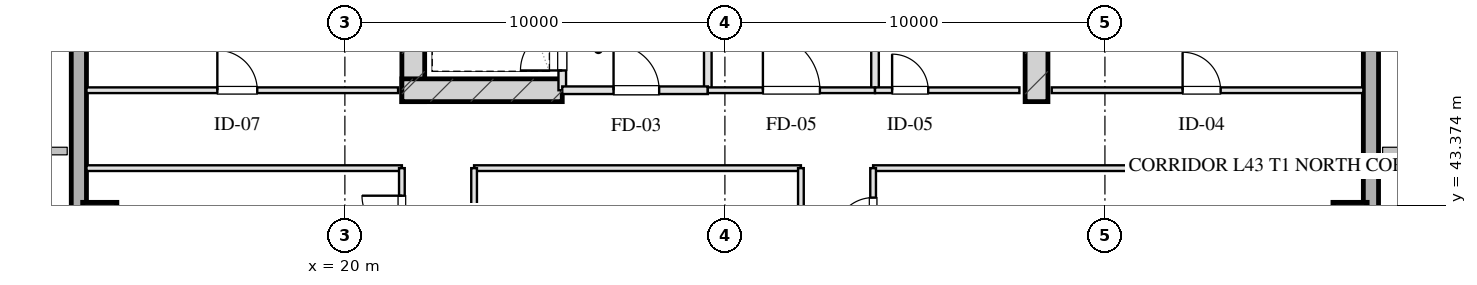
"""IFC4 building model, lengths in metres.
Left out: names, types, materials, properties, quantities, classifications, styles, units other than length and angle.
Written with IfcOpenShell. Run it as: python <this file> out.ifc"""

import sys

from ifc_helpers import new_model, si_unit, direction, frame, frame_2d, origin, origin_2d, place, context, subcontext, project, spatial, rectangle, hollow_rectangle, extrude, element, fill, save


model = new_model("IFC4")
c1 = context("Model", 3, precision=1e-05, world=origin(), true_north=direction((0.0, 1.0)))
c2 = subcontext(c1, "Body", "Model", "MODEL_VIEW")
j1 = project(units=[si_unit("LENGTHUNIT", "METRE"), si_unit("PLANEANGLEUNIT", "RADIAN")], contexts=[c1])
p1 = place(None, origin())
s1 = spatial("IfcSite", under=j1, at=p1, CompositionType="ELEMENT")
p2 = place(p1, origin())
s2 = spatial("IfcBuilding", under=s1, at=p2, CompositionType="ELEMENT")
p3 = place(p2, frame((0.0, 0.0, 163.3)))
s3 = spatial("IfcBuildingStorey", under=s2, at=p3, CompositionType="ELEMENT", Elevation=163.3)
for number, where, z_axis, x_axis in (
    (1, (21.8, 46.1, 0.0), (0.0, 0.0, 1.0), (0.0, 1.0, 0.0)),
    (2, (38.2, 46.1, 0.0), (0.0, 0.0, 1.0), (0.0, 1.0, 0.0)),
):
    element("IfcWall", number, at=place(p3, frame(where, z_axis=z_axis, x_axis=x_axis)), inside=s3, PredefinedType="SHEAR", context=c2, shape_type="SweptSolid", body=[
        extrude(rectangle(XDim=9.48, YDim=0.6, at=frame_2d((4.74, 0.0))), origin(), (0.0, 0.0, 1.0), 3.45),
    ])
p4 = place(p3, frame((21.5, 46.4, 0.0), z_axis=(0.0, 0.0, 1.0), x_axis=(1.0, 0.0, 0.0)))
e3 = element("IfcWall", 3, at=p4, inside=s3, PredefinedType="SHEAR", context=c2, shape_type="SweptSolid", body=[
    extrude(rectangle(XDim=4.22, YDim=0.6, at=frame_2d((2.11, 0.0))), origin(), (0.0, 0.0, 1.0), 3.45),
])
for number, where, z_axis, x_axis in (
    (4, (13.55, 43.0, 0.0), (0.0, 0.0, 1.0), (1.0, 0.0, 0.0)),
    (5, (46.45, 43.0, 0.0), (0.0, 0.0, 1.0), (1.0, 0.0, 0.0)),
):
    element("IfcColumn", number, at=place(p3, frame(where, z_axis=z_axis, x_axis=x_axis)), inside=s3, PredefinedType="COLUMN", context=c2, shape_type="SweptSolid", body=[
        extrude(hollow_rectangle(XDim=0.9, YDim=0.9, WallThickness=0.032, at=origin_2d()), origin(), (0.0, 0.0, 1.0), 3.451),
    ])
p5 = place(p3, frame((13.0, 10.8, 0.0), z_axis=(0.0, 0.0, 1.0), x_axis=(0.0, 1.0, 0.0)))
e6 = element("IfcWall", 6, at=p5, inside=s3, PredefinedType="SOLIDWALL", context=c2, shape_type="SweptSolid", body=[
    extrude(rectangle(XDim=46.4, YDim=0.4, at=frame_2d((23.2, 0.0))), origin(), (0.0, 0.0, 1.0), 2.61),
])
p6 = place(p5, frame((28.45, 0.0, 0.0)))
e7 = element("IfcOpeningElement", 7, at=p6, cuts=e6, PredefinedType="OPENING", context=c2, shape_type="SweptSolid", body=[
    extrude(rectangle(XDim=1.1, YDim=2.15, at=frame_2d((0.55, 1.075))), frame((0.0, 0.21, 0.0), z_axis=(0.0, -1.0, 0.0), x_axis=(1.0, 0.0, 0.0)), (0.0, 0.0, 1.0), 0.42),
])
p7 = place(p3, frame((47.0, 57.2, 0.0), z_axis=(0.0, 0.0, 1.0), x_axis=(0.0, -1.0, 0.0)))
e8 = element("IfcWall", 8, at=p7, inside=s3, PredefinedType="SOLIDWALL", context=c2, shape_type="SweptSolid", body=[
    extrude(rectangle(XDim=46.4, YDim=0.4, at=frame_2d((23.2, 0.0))), origin(), (0.0, 0.0, 1.0), 2.61),
])
p8 = place(p7, frame((28.475, 0.0, 0.75)))
e9 = element("IfcOpeningElement", 9, at=p8, cuts=e8, PredefinedType="OPENING", context=c2, shape_type="SweptSolid", body=[
    extrude(rectangle(XDim=2.25, YDim=1.46, at=frame_2d((1.125, 0.73))), frame((0.0, 0.21, 0.0), z_axis=(0.0, -1.0, 0.0), x_axis=(1.0, 0.0, 0.0)), (0.0, 0.0, 1.0), 0.42),
])
p9 = place(p7, frame((24.675, 0.0, 0.75)))
e10 = element("IfcOpeningElement", 10, at=p9, cuts=e8, PredefinedType="OPENING", context=c2, shape_type="SweptSolid", body=[
    extrude(rectangle(XDim=2.25, YDim=1.46, at=frame_2d((1.125, 0.73))), frame((0.0, 0.21, 0.0), z_axis=(0.0, -1.0, 0.0), x_axis=(1.0, 0.0, 0.0)), (0.0, 0.0, 1.0), 0.42),
])
p10 = place(p7, frame((18.25, 0.0, 0.0)))
e11 = element("IfcOpeningElement", 11, at=p10, cuts=e8, PredefinedType="OPENING", context=c2, shape_type="SweptSolid", body=[
    extrude(rectangle(XDim=1.1, YDim=2.15, at=frame_2d((0.55, 1.075))), frame((0.0, 0.21, 0.0), z_axis=(0.0, -1.0, 0.0), x_axis=(1.0, 0.0, 0.0)), (0.0, 0.0, 1.0), 0.42),
])
p11 = place(p3, frame((25.72, 46.4, 0.0), z_axis=(0.0, 0.0, 1.0), x_axis=(0.0, 1.0, 0.0)))
e12 = element("IfcWall", 12, at=p11, inside=s3, PredefinedType="PARTITIONING", context=c2, shape_type="SweptSolid", body=[
    extrude(rectangle(XDim=1.9, YDim=0.2, at=frame_2d((0.95, 0.0))), origin(), (0.0, 0.0, 1.0), 3.175),
])
p12 = place(p11, frame((0.52, 0.0, 0.0)))
e13 = element("IfcOpeningElement", 13, at=p12, cuts=e12, PredefinedType="OPENING", context=c2, shape_type="SweptSolid", body=[
    extrude(rectangle(XDim=1.1, YDim=2.05, at=frame_2d((0.55, 1.025))), frame((0.0, 0.11, 0.0), z_axis=(0.0, -1.0, 0.0), x_axis=(1.0, 0.0, 0.0)), (0.0, 0.0, 1.0), 0.22),
])
p13 = place(p3, frame((29.55, 46.4, 0.0), z_axis=(0.0, 0.0, 1.0), x_axis=(0.0, 1.0, 0.0)))
e14 = element("IfcWall", 14, at=p13, inside=s3, PredefinedType="PARTITIONING", context=c2, shape_type="SweptSolid", body=[
    extrude(rectangle(XDim=8.43, YDim=0.2, at=frame_2d((4.215, 0.0))), origin(), (0.0, 0.0, 1.0), 3.175),
])
p14 = place(p3, frame((25.72, 46.4, 0.0), z_axis=(0.0, 0.0, 1.0), x_axis=(1.0, 0.0, 0.0)))
e15 = element("IfcWall", 15, at=p14, inside=s3, PredefinedType="PARTITIONING", context=c2, shape_type="SweptSolid", body=[
    extrude(rectangle(XDim=3.83, YDim=0.2, at=frame_2d((1.915, 0.0))), origin(), (0.0, 0.0, 1.0), 3.175),
])
p15 = place(p14, frame((1.35, 0.0, 0.0)))
e16 = element("IfcOpeningElement", 16, at=p15, cuts=e15, PredefinedType="OPENING", context=c2, shape_type="SweptSolid", body=[
    extrude(rectangle(XDim=1.2, YDim=2.05, at=frame_2d((0.6, 1.025))), frame((0.0, 0.11, 0.0), z_axis=(0.0, -1.0, 0.0), x_axis=(1.0, 0.0, 0.0)), (0.0, 0.0, 1.0), 0.22),
])
p16 = place(p3, frame((33.95, 46.4, 0.0), z_axis=(0.0, 0.0, 1.0), x_axis=(0.0, 1.0, 0.0)))
e17 = element("IfcWall", 17, at=p16, inside=s3, PredefinedType="PARTITIONING", context=c2, shape_type="SweptSolid", body=[
    extrude(rectangle(XDim=8.43, YDim=0.2, at=frame_2d((4.215, 0.0))), origin(), (0.0, 0.0, 1.0), 3.175),
])
p17 = place(p3, frame((29.55, 46.4, 0.0), z_axis=(0.0, 0.0, 1.0), x_axis=(1.0, 0.0, 0.0)))
e18 = element("IfcWall", 18, at=p17, inside=s3, PredefinedType="PARTITIONING", context=c2, shape_type="SweptSolid", body=[
    extrude(rectangle(XDim=4.4, YDim=0.15, at=frame_2d((2.2, 0.0))), origin(), (0.0, 0.0, 1.0), 3.175),
])
p18 = place(p17, frame((1.45, 0.0, 0.0)))
e19 = element("IfcOpeningElement", 19, at=p18, cuts=e18, PredefinedType="OPENING", context=c2, shape_type="SweptSolid", body=[
    extrude(rectangle(XDim=1.5, YDim=2.05, at=frame_2d((0.75, 1.025))), frame((0.0, 0.085, 0.0), z_axis=(0.0, -1.0, 0.0), x_axis=(1.0, 0.0, 0.0)), (0.0, 0.0, 1.0), 0.17),
])
p19 = place(p3, frame((33.95, 46.4, 0.0), z_axis=(0.0, 0.0, 1.0), x_axis=(1.0, 0.0, 0.0)))
e20 = element("IfcWall", 20, at=p19, inside=s3, PredefinedType="PARTITIONING", context=c2, shape_type="SweptSolid", body=[
    extrude(rectangle(XDim=3.8, YDim=0.15, at=frame_2d((1.9, 0.0))), origin(), (0.0, 0.0, 1.0), 3.175),
])
p20 = place(p19, frame((0.45, 0.0, 0.0)))
e21 = element("IfcOpeningElement", 21, at=p20, cuts=e20, PredefinedType="OPENING", context=c2, shape_type="SweptSolid", body=[
    extrude(rectangle(XDim=0.95, YDim=2.05, at=frame_2d((0.475, 1.025))), frame((0.0, 0.085, 0.0), z_axis=(0.0, -1.0, 0.0), x_axis=(1.0, 0.0, 0.0)), (0.0, 0.0, 1.0), 0.17),
])
p21 = place(p3, frame((13.2, 46.4, 0.0), z_axis=(0.0, 0.0, 1.0), x_axis=(1.0, 0.0, 0.0)))
e22 = element("IfcWall", 22, at=p21, inside=s3, PredefinedType="PARTITIONING", context=c2, shape_type="SweptSolid", body=[
    extrude(rectangle(XDim=8.2, YDim=0.15, at=frame_2d((4.1, 0.0))), origin(), (0.0, 0.0, 1.0), 3.175),
])
p22 = place(p21, frame((3.444, 0.0, 0.0)))
e23 = element("IfcOpeningElement", 23, at=p22, cuts=e22, PredefinedType="OPENING", context=c2, shape_type="SweptSolid", body=[
    extrude(rectangle(XDim=1.05, YDim=2.05, at=frame_2d((0.525, 1.025))), frame((0.0, 0.085, 0.0), z_axis=(0.0, -1.0, 0.0), x_axis=(1.0, 0.0, 0.0)), (0.0, 0.0, 1.0), 0.17),
])
p23 = place(p3, frame((38.6, 46.4, 0.0), z_axis=(0.0, 0.0, 1.0), x_axis=(1.0, 0.0, 0.0)))
e24 = element("IfcWall", 24, at=p23, inside=s3, PredefinedType="PARTITIONING", context=c2, shape_type="SweptSolid", body=[
    extrude(rectangle(XDim=8.2, YDim=0.15, at=frame_2d((4.1, 0.0))), origin(), (0.0, 0.0, 1.0), 3.175),
])
p24 = place(p23, frame((3.444, 0.0, 0.0)))
e25 = element("IfcOpeningElement", 25, at=p24, cuts=e24, PredefinedType="OPENING", context=c2, shape_type="SweptSolid", body=[
    extrude(rectangle(XDim=1.0, YDim=2.05, at=frame_2d((0.5, 1.025))), frame((0.0, 0.085, 0.0), z_axis=(0.0, -1.0, 0.0), x_axis=(1.0, 0.0, 0.0)), (0.0, 0.0, 1.0), 0.17),
])
p25 = place(p3, frame((13.2, 44.35, 0.0), z_axis=(0.0, 0.0, 1.0), x_axis=(1.0, 0.0, 0.0)))
e26 = element("IfcWall", 26, at=p25, inside=s3, PredefinedType="PARTITIONING", context=c2, shape_type="SweptSolid", body=[
    extrude(rectangle(XDim=8.3, YDim=0.15, at=frame_2d((4.15, 0.0))), origin(), (0.0, 0.0, 1.0), 3.175),
])
p26 = place(p3, frame((23.4, 44.35, 0.0), z_axis=(0.0, 0.0, 1.0), x_axis=(1.0, 0.0, 0.0)))
e27 = element("IfcWall", 27, at=p26, inside=s3, PredefinedType="PARTITIONING", context=c2, shape_type="SweptSolid", body=[
    extrude(rectangle(XDim=8.6, YDim=0.15, at=frame_2d((4.3, 0.0))), origin(), (0.0, 0.0, 1.0), 3.175),
])
p27 = place(p3, frame((33.9, 44.35, 0.0), z_axis=(0.0, 0.0, 1.0), x_axis=(1.0, 0.0, 0.0)))
e28 = element("IfcWall", 28, at=p27, inside=s3, PredefinedType="PARTITIONING", context=c2, shape_type="SweptSolid", body=[
    extrude(rectangle(XDim=12.9, YDim=0.15, at=frame_2d((6.45, 0.0))), origin(), (0.0, 0.0, 1.0), 3.175),
])
p28 = place(p3, frame((21.5, 23.65, 0.0), z_axis=(0.0, 0.0, 1.0), x_axis=(0.0, 1.0, 0.0)))
e29 = element("IfcWall", 29, at=p28, inside=s3, PredefinedType="PARTITIONING", context=c2, shape_type="SweptSolid", body=[
    extrude(rectangle(XDim=20.7, YDim=0.15, at=frame_2d((10.35, 0.0))), origin(), (0.0, 0.0, 1.0), 3.175),
])
p29 = place(p28, frame((0.775, 0.0, 0.0)))
e30 = element("IfcOpeningElement", 30, at=p29, cuts=e29, PredefinedType="OPENING", context=c2, shape_type="SweptSolid", body=[
    extrude(rectangle(XDim=1.0, YDim=2.05, at=frame_2d((0.5, 1.025))), frame((0.0, 0.085, 0.0), z_axis=(0.0, -1.0, 0.0), x_axis=(1.0, 0.0, 0.0)), (0.0, 0.0, 1.0), 0.17),
])
p30 = place(p28, frame((3.95, 0.0, 0.0)))
e31 = element("IfcOpeningElement", 31, at=p30, cuts=e29, PredefinedType="OPENING", context=c2, shape_type="SweptSolid", body=[
    extrude(rectangle(XDim=1.0, YDim=2.05, at=frame_2d((0.5, 1.025))), frame((0.0, 0.085, 0.0), z_axis=(0.0, -1.0, 0.0), x_axis=(1.0, 0.0, 0.0)), (0.0, 0.0, 1.0), 0.17),
])
p31 = place(p28, frame((7.51, 0.0, 0.0)))
e32 = element("IfcOpeningElement", 32, at=p31, cuts=e29, PredefinedType="OPENING", context=c2, shape_type="SweptSolid", body=[
    extrude(rectangle(XDim=1.0, YDim=2.05, at=frame_2d((0.5, 1.025))), frame((0.0, 0.085, 0.0), z_axis=(0.0, -1.0, 0.0), x_axis=(1.0, 0.0, 0.0)), (0.0, 0.0, 1.0), 0.17),
])
p32 = place(p28, frame((11.51, 0.0, 0.0)))
e33 = element("IfcOpeningElement", 33, at=p32, cuts=e29, PredefinedType="OPENING", context=c2, shape_type="SweptSolid", body=[
    extrude(rectangle(XDim=0.85, YDim=2.05, at=frame_2d((0.425, 1.025))), frame((0.0, 0.085, 0.0), z_axis=(0.0, -1.0, 0.0), x_axis=(1.0, 0.0, 0.0)), (0.0, 0.0, 1.0), 0.17),
])
p33 = place(p28, frame((15.75, 0.0, 0.0)))
e34 = element("IfcOpeningElement", 34, at=p33, cuts=e29, PredefinedType="OPENING", context=c2, shape_type="SweptSolid", body=[
    extrude(rectangle(XDim=1.0, YDim=2.05, at=frame_2d((0.5, 1.025))), frame((0.0, 0.085, 0.0), z_axis=(0.0, -1.0, 0.0), x_axis=(1.0, 0.0, 0.0)), (0.0, 0.0, 1.0), 0.17),
])
p34 = place(p28, frame((18.925, 0.0, 0.0)))
e35 = element("IfcOpeningElement", 35, at=p34, cuts=e29, PredefinedType="OPENING", context=c2, shape_type="SweptSolid", body=[
    extrude(rectangle(XDim=1.05, YDim=2.05, at=frame_2d((0.525, 1.025))), frame((0.0, 0.085, 0.0), z_axis=(0.0, -1.0, 0.0), x_axis=(1.0, 0.0, 0.0)), (0.0, 0.0, 1.0), 0.17),
])
p35 = place(p3, frame((23.4, 23.65, 0.0), z_axis=(0.0, 0.0, 1.0), x_axis=(0.0, 1.0, 0.0)))
e36 = element("IfcWall", 36, at=p35, inside=s3, PredefinedType="PARTITIONING", context=c2, shape_type="SweptSolid", body=[
    extrude(rectangle(XDim=20.7, YDim=0.15, at=frame_2d((10.35, 0.0))), origin(), (0.0, 0.0, 1.0), 3.175),
])
p36 = place(p35, frame((4.117, 0.0, 0.0)))
e37 = element("IfcOpeningElement", 37, at=p36, cuts=e36, PredefinedType="OPENING", context=c2, shape_type="SweptSolid", body=[
    extrude(rectangle(XDim=1.1, YDim=2.05, at=frame_2d((0.55, 1.025))), frame((0.0, 0.085, 0.0), z_axis=(0.0, -1.0, 0.0), x_axis=(1.0, 0.0, 0.0)), (0.0, 0.0, 1.0), 0.17),
])
p37 = place(p35, frame((14.347, 0.0, 0.0)))
e38 = element("IfcOpeningElement", 38, at=p37, cuts=e36, PredefinedType="OPENING", context=c2, shape_type="SweptSolid", body=[
    extrude(rectangle(XDim=1.1, YDim=2.05, at=frame_2d((0.55, 1.025))), frame((0.0, 0.085, 0.0), z_axis=(0.0, -1.0, 0.0), x_axis=(1.0, 0.0, 0.0)), (0.0, 0.0, 1.0), 0.17),
])
p38 = place(p3, frame((32.0, 23.65, 0.0), z_axis=(0.0, 0.0, 1.0), x_axis=(0.0, 1.0, 0.0)))
e39 = element("IfcWall", 39, at=p38, inside=s3, PredefinedType="PARTITIONING", context=c2, shape_type="SweptSolid", body=[
    extrude(rectangle(XDim=20.7, YDim=0.15, at=frame_2d((10.35, 0.0))), origin(), (0.0, 0.0, 1.0), 3.175),
])
p39 = place(p3, frame((33.9, 23.65, 0.0), z_axis=(0.0, 0.0, 1.0), x_axis=(0.0, 1.0, 0.0)))
e40 = element("IfcWall", 40, at=p39, inside=s3, PredefinedType="PARTITIONING", context=c2, shape_type="SweptSolid", body=[
    extrude(rectangle(XDim=20.7, YDim=0.15, at=frame_2d((10.35, 0.0))), origin(), (0.0, 0.0, 1.0), 3.175),
])
p40 = place(p39, frame((2.329, 0.0, 0.0)))
e41 = element("IfcOpeningElement", 41, at=p40, cuts=e40, PredefinedType="OPENING", context=c2, shape_type="SweptSolid", body=[
    extrude(rectangle(XDim=1.0, YDim=2.05, at=frame_2d((0.5, 1.025))), frame((0.0, 0.085, 0.0), z_axis=(0.0, -1.0, 0.0), x_axis=(1.0, 0.0, 0.0)), (0.0, 0.0, 1.0), 0.17),
])
p41 = place(p39, frame((8.104, 0.0, 0.0)))
e42 = element("IfcOpeningElement", 42, at=p41, cuts=e40, PredefinedType="OPENING", context=c2, shape_type="SweptSolid", body=[
    extrude(rectangle(XDim=1.0, YDim=2.05, at=frame_2d((0.5, 1.025))), frame((0.0, 0.085, 0.0), z_axis=(0.0, -1.0, 0.0), x_axis=(1.0, 0.0, 0.0)), (0.0, 0.0, 1.0), 0.17),
])
p42 = place(p39, frame((14.35, 0.0, 0.0)))
e43 = element("IfcOpeningElement", 43, at=p42, cuts=e40, PredefinedType="OPENING", context=c2, shape_type="SweptSolid", body=[
    extrude(rectangle(XDim=1.0, YDim=2.05, at=frame_2d((0.5, 1.025))), frame((0.0, 0.085, 0.0), z_axis=(0.0, -1.0, 0.0), x_axis=(1.0, 0.0, 0.0)), (0.0, 0.0, 1.0), 0.17),
])
p43 = place(p39, frame((18.925, 0.0, 0.0)))
e44 = element("IfcOpeningElement", 44, at=p43, cuts=e40, PredefinedType="OPENING", context=c2, shape_type="SweptSolid", body=[
    extrude(rectangle(XDim=1.0, YDim=2.05, at=frame_2d((0.5, 1.025))), frame((0.0, 0.085, 0.0), z_axis=(0.0, -1.0, 0.0), x_axis=(1.0, 0.0, 0.0)), (0.0, 0.0, 1.0), 0.17),
])
p44 = place(p12, origin())
e45 = element("IfcDoor", 45, at=p44, inside=s3, OperationType="SINGLE_SWING_LEFT", PredefinedType="DOOR", context=c2, shape_type="SweptSolid", body=[
    extrude(rectangle(XDim=1.1, YDim=2.05, at=frame_2d((0.55, 1.025))), frame((0.0, 0.025, 0.0), z_axis=(0.0, -1.0, 0.0), x_axis=(1.0, 0.0, 0.0)), (0.0, 0.0, 1.0), 0.05),
])
fill(e13, e45)
p45 = place(p15, origin())
e46 = element("IfcDoor", 46, at=p45, inside=s3, OperationType="SINGLE_SWING_LEFT", PredefinedType="DOOR", context=c2, shape_type="SweptSolid", body=[
    extrude(rectangle(XDim=1.2, YDim=2.05, at=frame_2d((0.6, 1.025))), frame((0.0, 0.025, 0.0), z_axis=(0.0, -1.0, 0.0), x_axis=(1.0, 0.0, 0.0)), (0.0, 0.0, 1.0), 0.05),
])
fill(e16, e46)
p46 = place(p18, origin())
e47 = element("IfcDoor", 47, at=p46, inside=s3, OperationType="SINGLE_SWING_LEFT", PredefinedType="DOOR", context=c2, shape_type="SweptSolid", body=[
    extrude(rectangle(XDim=1.5, YDim=2.05, at=frame_2d((0.75, 1.025))), frame((0.0, 0.025, 0.0), z_axis=(0.0, -1.0, 0.0), x_axis=(1.0, 0.0, 0.0)), (0.0, 0.0, 1.0), 0.05),
])
fill(e19, e47)
p47 = place(p20, origin())
e48 = element("IfcDoor", 48, at=p47, inside=s3, OperationType="SINGLE_SWING_LEFT", PredefinedType="DOOR", context=c2, shape_type="SweptSolid", body=[
    extrude(rectangle(XDim=0.95, YDim=2.05, at=frame_2d((0.475, 1.025))), frame((0.0, 0.025, 0.0), z_axis=(0.0, -1.0, 0.0), x_axis=(1.0, 0.0, 0.0)), (0.0, 0.0, 1.0), 0.05),
])
fill(e21, e48)
p48 = place(p22, origin())
e49 = element("IfcDoor", 49, at=p48, inside=s3, OperationType="SINGLE_SWING_LEFT", PredefinedType="DOOR", context=c2, shape_type="SweptSolid", body=[
    extrude(rectangle(XDim=1.05, YDim=2.05, at=frame_2d((0.525, 1.025))), frame((0.0, 0.025, 0.0), z_axis=(0.0, -1.0, 0.0), x_axis=(1.0, 0.0, 0.0)), (0.0, 0.0, 1.0), 0.05),
])
fill(e23, e49)
p49 = place(p24, origin())
e50 = element("IfcDoor", 50, at=p49, inside=s3, OperationType="SINGLE_SWING_LEFT", PredefinedType="DOOR", context=c2, shape_type="SweptSolid", body=[
    extrude(rectangle(XDim=1.0, YDim=2.05, at=frame_2d((0.5, 1.025))), frame((0.0, 0.025, 0.0), z_axis=(0.0, -1.0, 0.0), x_axis=(1.0, 0.0, 0.0)), (0.0, 0.0, 1.0), 0.05),
])
fill(e25, e50)
p50 = place(p34, origin())
e51 = element("IfcDoor", 51, at=p50, inside=s3, OperationType="SINGLE_SWING_RIGHT", PredefinedType="DOOR", context=c2, shape_type="SweptSolid", body=[
    extrude(rectangle(XDim=1.05, YDim=2.05, at=frame_2d((0.525, 1.025))), frame((0.0, 0.025, 0.0), z_axis=(0.0, -1.0, 0.0), x_axis=(1.0, 0.0, 0.0)), (0.0, 0.0, 1.0), 0.05),
])
fill(e35, e51)
p51 = place(p43, origin())
e52 = element("IfcDoor", 52, at=p51, inside=s3, OperationType="SINGLE_SWING_LEFT", PredefinedType="DOOR", context=c2, shape_type="SweptSolid", body=[
    extrude(rectangle(XDim=1.0, YDim=2.05, at=frame_2d((0.5, 1.025))), frame((0.0, 0.025, 0.0), z_axis=(0.0, -1.0, 0.0), x_axis=(1.0, 0.0, 0.0)), (0.0, 0.0, 1.0), 0.05),
])
fill(e44, e52)
save(model, sys.argv[1])
